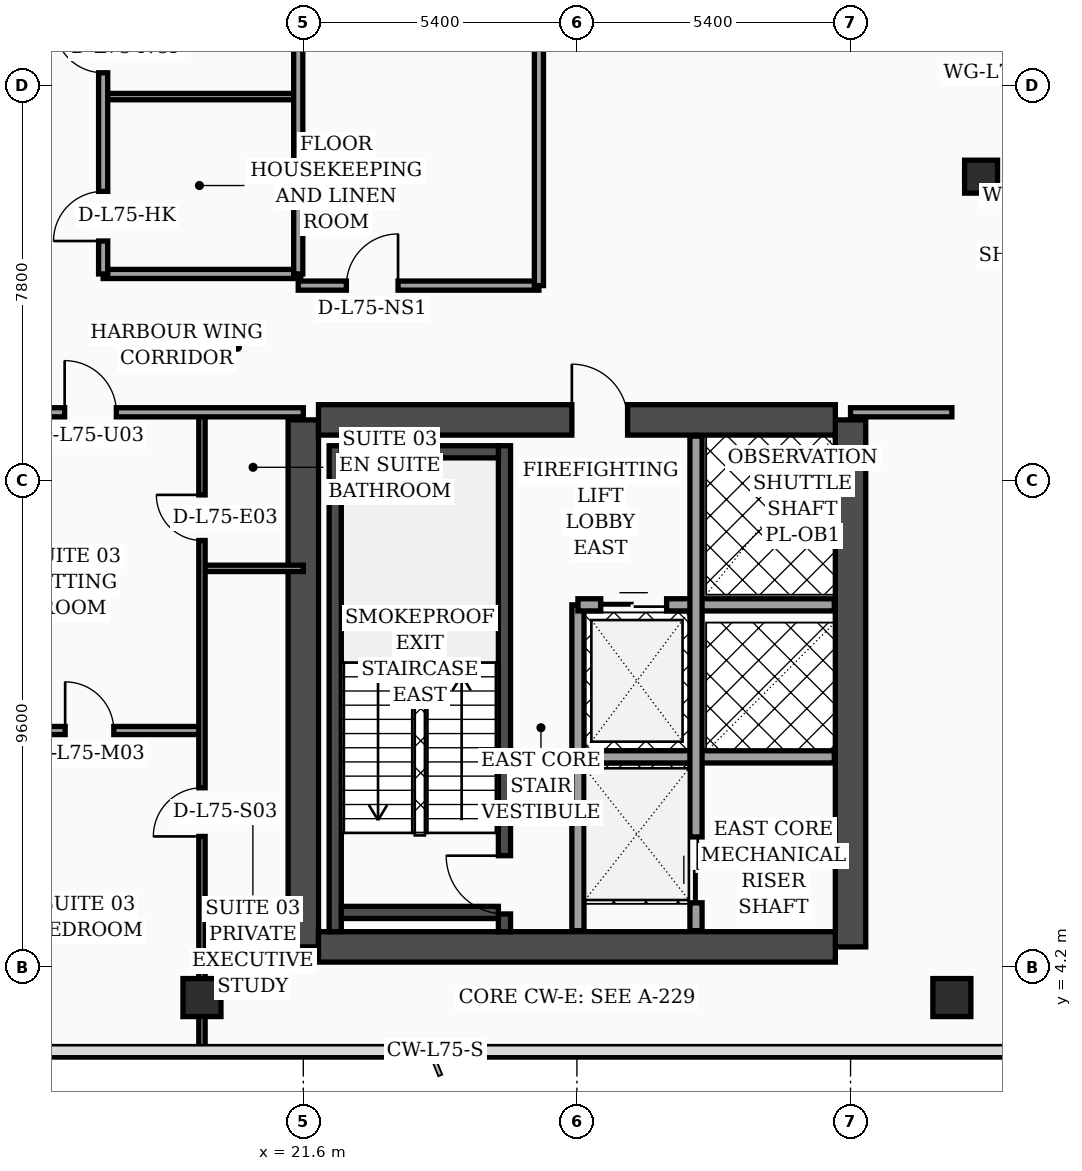
"""IFC4 building model, lengths in metres.
Left out: names, types, materials, properties, quantities, classifications, styles, units other than length and angle.
Written with IfcOpenShell. Run it as: python <this file> out.ifc"""

import sys

from ifc_helpers import new_model, si_unit, direction, frame, frame_2d, origin, origin_2d, place, context, subcontext, project, spatial, rectangle, hollow_rectangle, extrude, element, fill, save


model = new_model("IFC4")
c1 = context("Model", 3, precision=1e-05, world=origin(), true_north=direction((0.0, 1.0)))
c2 = subcontext(c1, "Body", "Model", "MODEL_VIEW")
j1 = project(units=[si_unit("LENGTHUNIT", "METRE"), si_unit("PLANEANGLEUNIT", "RADIAN")], contexts=[c1])
p1 = place(None, origin())
s1 = spatial("IfcSite", under=j1, at=p1, CompositionType="ELEMENT")
p2 = place(p1, origin())
s2 = spatial("IfcBuilding", under=s1, at=p2, CompositionType="ELEMENT")
p3 = place(p2, frame((0.0, 0.0, 302.5)))
s3 = spatial("IfcBuildingStorey", under=s2, at=p3, CompositionType="ELEMENT", Elevation=302.5)
for number, where, z_axis, x_axis in (
    (1, (21.6, 4.6, 0.0), (0.0, 0.0, 1.0), (0.0, 1.0, 0.0)),
    (2, (32.4, 4.6, 0.0), (0.0, 0.0, 1.0), (0.0, 1.0, 0.0)),
):
    element("IfcWall", number, at=place(p3, frame(where, z_axis=z_axis, x_axis=x_axis)), inside=s3, PredefinedType="SHEAR", context=c2, shape_type="SweptSolid", body=[
        extrude(rectangle(XDim=10.4, YDim=0.6, at=frame_2d((5.2, 0.0))), origin(), (0.0, 0.0, 1.0), 4.05),
    ])
p4 = place(p3, frame((21.9, 15.0, 0.0), z_axis=(0.0, 0.0, 1.0), x_axis=(1.0, 0.0, 0.0)))
e3 = element("IfcWall", 3, at=p4, inside=s3, PredefinedType="SHEAR", context=c2, shape_type="SweptSolid", body=[
    extrude(rectangle(XDim=10.2, YDim=0.6, at=frame_2d((5.1, 0.0))), origin(), (0.0, 0.0, 1.0), 4.05),
])
p5 = place(p4, frame((5.0, 0.0, 0.0)))
e4 = element("IfcOpeningElement", 4, at=p5, cuts=e3, PredefinedType="OPENING", context=c2, shape_type="SweptSolid", body=[
    extrude(rectangle(XDim=1.1, YDim=2.2, at=frame_2d((0.55, 1.1))), frame((0.0, 0.31, 0.0), z_axis=(0.0, -1.0, 0.0), x_axis=(1.0, 0.0, 0.0)), (0.0, 0.0, 1.0), 0.62),
])
p6 = place(p3, frame((21.9, 4.6, 0.0), z_axis=(0.0, 0.0, 1.0), x_axis=(1.0, 0.0, 0.0)))
e5 = element("IfcWall", 5, at=p6, inside=s3, PredefinedType="SHEAR", context=c2, shape_type="SweptSolid", body=[
    extrude(rectangle(XDim=10.2, YDim=0.6, at=frame_2d((5.1, 0.0))), origin(), (0.0, 0.0, 1.0), 4.05),
])
p7 = place(p3, frame((22.23, 4.9, 0.0), z_axis=(0.0, 0.0, 1.0), x_axis=(0.0, 1.0, 0.0)))
e6 = element("IfcWall", 6, at=p7, inside=s3, PredefinedType="SOLIDWALL", context=c2, shape_type="SweptSolid", body=[
    extrude(rectangle(XDim=9.59, YDim=0.24, at=frame_2d((4.795, 0.0))), origin(), (0.0, 0.0, 1.0), 4.05),
])
p8 = place(p3, frame((25.57, 4.9, 0.0), z_axis=(0.0, 0.0, 1.0), x_axis=(0.0, 1.0, 0.0)))
e7 = element("IfcWall", 7, at=p8, inside=s3, PredefinedType="SOLIDWALL", context=c2, shape_type="SweptSolid", body=[
    extrude(rectangle(XDim=9.59, YDim=0.24, at=frame_2d((4.795, 0.0))), origin(), (0.0, 0.0, 1.0), 4.05),
])
p9 = place(p8, frame((0.35, 0.0, 0.0)))
e8 = element("IfcOpeningElement", 8, at=p9, cuts=e7, PredefinedType="OPENING", context=c2, shape_type="SweptSolid", body=[
    extrude(rectangle(XDim=1.15, YDim=2.2, at=frame_2d((0.575, 1.1))), frame((0.0, 0.13, 0.0), z_axis=(0.0, -1.0, 0.0), x_axis=(1.0, 0.0, 0.0)), (0.0, 0.0, 1.0), 0.26),
])
for number, where, z_axis, x_axis in (
    (9, (22.35, 5.28, 0.0), (0.0, 0.0, 1.0), (1.0, 0.0, 0.0)),
    (10, (22.35, 14.37, 0.0), (0.0, 0.0, 1.0), (1.0, 0.0, 0.0)),
):
    element("IfcWall", number, at=place(p3, frame(where, z_axis=z_axis, x_axis=x_axis)), inside=s3, PredefinedType="SOLIDWALL", context=c2, shape_type="SweptSolid", body=[
        extrude(rectangle(XDim=3.1, YDim=0.24, at=frame_2d((1.55, 0.0))), origin(), (0.0, 0.0, 1.0), 4.05),
    ])
for number, where, z_axis, x_axis in (
    (11, (19.6, 3.6, 0.0), (0.0, 0.0, 1.0), (1.0, 0.0, 0.0)),
    (12, (34.4, 3.6, 0.0), (0.0, 0.0, 1.0), (1.0, 0.0, 0.0)),
):
    element("IfcColumn", number, at=place(p3, frame(where, z_axis=z_axis, x_axis=x_axis)), inside=s3, PredefinedType="COLUMN", context=c2, shape_type="SweptSolid", body=[
        extrude(hollow_rectangle(XDim=0.75, YDim=0.75, WallThickness=0.032, at=origin_2d()), origin(), (0.0, 0.0, 1.0), 4.05),
    ])
p10 = place(p3, frame((34.976, 19.8, 0.0), z_axis=(0.0, 0.0, 1.0), x_axis=(1.0, 0.0, 0.0)))
e13 = element("IfcColumn", 13, at=p10, inside=s3, PredefinedType="COLUMN", context=c2, shape_type="SweptSolid", body=[
    extrude(hollow_rectangle(XDim=0.65, YDim=0.65, WallThickness=0.028, at=origin_2d()), origin(), (0.0, 0.0, 1.0), 4.05),
])
p11 = place(p3, frame((41.03, 5.505, 0.0), z_axis=(0.0, 0.0, 1.0), x_axis=(-0.300509063924, 0.953778958931, 0.0)))
e14 = element("IfcWall", 14, at=p11, inside=s3, PredefinedType="SOLIDWALL", context=c2, shape_type="SweptSolid", body=[
    extrude(rectangle(XDim=30.814, YDim=0.32, at=frame_2d((15.407, 0.0))), origin(), (0.0, 0.0, 1.0), 4.05),
])
p12 = place(p11, frame((18.796, 0.0, 0.0)))
e15 = element("IfcOpeningElement", 15, at=p12, cuts=e14, PredefinedType="OPENING", context=c2, shape_type="SweptSolid", body=[
    extrude(rectangle(XDim=1.4, YDim=2.25, at=frame_2d((0.7, 1.125))), frame((0.0, 0.17, 0.0), z_axis=(0.0, -1.0, 0.0), x_axis=(1.0, 0.0, 0.0)), (0.0, 0.0, 1.0), 0.34),
])
p13 = place(p11, frame((4.437, 0.0, 0.7)))
e16 = element("IfcOpeningElement", 16, at=p13, cuts=e14, PredefinedType="OPENING", context=c2, shape_type="SweptSolid", body=[
    extrude(rectangle(XDim=1.6, YDim=1.65, at=frame_2d((0.8, 0.825))), frame((0.0, 0.17, 0.0), z_axis=(0.0, -1.0, 0.0), x_axis=(1.0, 0.0, 0.0)), (0.0, 0.0, 1.0), 0.34),
])
p14 = place(p11, frame((9.889, 0.0, 0.7)))
e17 = element("IfcOpeningElement", 17, at=p14, cuts=e14, PredefinedType="OPENING", context=c2, shape_type="SweptSolid", body=[
    extrude(rectangle(XDim=1.6, YDim=1.65, at=frame_2d((0.8, 0.825))), frame((0.0, 0.17, 0.0), z_axis=(0.0, -1.0, 0.0), x_axis=(1.0, 0.0, 0.0)), (0.0, 0.0, 1.0), 0.34),
])
p15 = place(p11, frame((1.6, 0.0, 0.75)))
e18 = element("IfcOpeningElement", 18, at=p15, cuts=e14, PredefinedType="OPENING", context=c2, shape_type="SweptSolid", body=[
    extrude(rectangle(XDim=1.5, YDim=1.6, at=frame_2d((0.75, 0.8))), frame((0.0, 0.17, 0.0), z_axis=(0.0, -1.0, 0.0), x_axis=(1.0, 0.0, 0.0)), (0.0, 0.0, 1.0), 0.34),
])
p16 = place(p11, frame((7.8, 0.0, 0.75)))
e19 = element("IfcOpeningElement", 19, at=p16, cuts=e14, PredefinedType="OPENING", context=c2, shape_type="SweptSolid", body=[
    extrude(rectangle(XDim=1.5, YDim=1.6, at=frame_2d((0.75, 0.8))), frame((0.0, 0.17, 0.0), z_axis=(0.0, -1.0, 0.0), x_axis=(1.0, 0.0, 0.0)), (0.0, 0.0, 1.0), 0.34),
])
p17 = place(p11, frame((11.95, 0.0, 0.75)))
e20 = element("IfcOpeningElement", 20, at=p17, cuts=e14, PredefinedType="OPENING", context=c2, shape_type="SweptSolid", body=[
    extrude(rectangle(XDim=1.5, YDim=1.6, at=frame_2d((0.75, 0.8))), frame((0.0, 0.17, 0.0), z_axis=(0.0, -1.0, 0.0), x_axis=(1.0, 0.0, 0.0)), (0.0, 0.0, 1.0), 0.34),
])
p18 = place(p11, frame((14.0, 0.0, 0.75)))
e21 = element("IfcOpeningElement", 21, at=p18, cuts=e14, PredefinedType="OPENING", context=c2, shape_type="SweptSolid", body=[
    extrude(rectangle(XDim=1.5, YDim=1.6, at=frame_2d((0.75, 0.8))), frame((0.0, 0.17, 0.0), z_axis=(0.0, -1.0, 0.0), x_axis=(1.0, 0.0, 0.0)), (0.0, 0.0, 1.0), 0.34),
])
p19 = place(p11, frame((16.55, 0.0, 0.75)))
e22 = element("IfcOpeningElement", 22, at=p19, cuts=e14, PredefinedType="OPENING", context=c2, shape_type="SweptSolid", body=[
    extrude(rectangle(XDim=1.5, YDim=1.6, at=frame_2d((0.75, 0.8))), frame((0.0, 0.17, 0.0), z_axis=(0.0, -1.0, 0.0), x_axis=(1.0, 0.0, 0.0)), (0.0, 0.0, 1.0), 0.34),
])
p20 = place(p11, frame((20.75, 0.0, 0.75)))
e23 = element("IfcOpeningElement", 23, at=p20, cuts=e14, PredefinedType="OPENING", context=c2, shape_type="SweptSolid", body=[
    extrude(rectangle(XDim=1.5, YDim=1.6, at=frame_2d((0.75, 0.8))), frame((0.0, 0.17, 0.0), z_axis=(0.0, -1.0, 0.0), x_axis=(1.0, 0.0, 0.0)), (0.0, 0.0, 1.0), 0.34),
])
p21 = place(p11, frame((23.3, 0.0, 0.75)))
e24 = element("IfcOpeningElement", 24, at=p21, cuts=e14, PredefinedType="OPENING", context=c2, shape_type="SweptSolid", body=[
    extrude(rectangle(XDim=1.5, YDim=1.6, at=frame_2d((0.75, 0.8))), frame((0.0, 0.17, 0.0), z_axis=(0.0, -1.0, 0.0), x_axis=(1.0, 0.0, 0.0)), (0.0, 0.0, 1.0), 0.34),
])
p22 = place(p11, frame((26.4, 0.0, 0.75)))
e25 = element("IfcOpeningElement", 25, at=p22, cuts=e14, PredefinedType="OPENING", context=c2, shape_type="SweptSolid", body=[
    extrude(rectangle(XDim=1.5, YDim=1.6, at=frame_2d((0.75, 0.8))), frame((0.0, 0.17, 0.0), z_axis=(0.0, -1.0, 0.0), x_axis=(1.0, 0.0, 0.0)), (0.0, 0.0, 1.0), 0.34),
])
p23 = place(p3, frame((27.02, 4.92, 0.0), z_axis=(0.0, 0.0, 1.0), x_axis=(0.0, 1.0, 0.0)))
e26 = element("IfcWall", 26, at=p23, inside=s3, PredefinedType="SOLIDWALL", context=c2, shape_type="SweptSolid", body=[
    extrude(rectangle(XDim=6.43, YDim=0.24, at=frame_2d((3.215, 0.0))), origin(), (0.0, 0.0, 1.0), 4.05),
])
p24 = place(p3, frame((27.02, 11.35, 0.0), z_axis=(0.0, 0.0, 1.0), x_axis=(1.0, 0.0, 0.0)))
e27 = element("IfcWall", 27, at=p24, inside=s3, PredefinedType="SOLIDWALL", context=c2, shape_type="SweptSolid", body=[
    extrude(rectangle(XDim=5.06, YDim=0.24, at=frame_2d((2.53, 0.0))), origin(), (0.0, 0.0, 1.0), 4.05),
])
p25 = place(p24, frame((0.45, 0.0, 0.0)))
e28 = element("IfcOpeningElement", 28, at=p25, cuts=e27, PredefinedType="OPENING", context=c2, shape_type="SweptSolid", body=[
    extrude(rectangle(XDim=1.3, YDim=2.35, at=frame_2d((0.65, 1.175))), frame((0.0, 0.13, 0.0), z_axis=(0.0, -1.0, 0.0), x_axis=(1.0, 0.0, 0.0)), (0.0, 0.0, 1.0), 0.26),
])
p26 = place(p3, frame((27.02, 8.35, 0.0), z_axis=(0.0, 0.0, 1.0), x_axis=(1.0, 0.0, 0.0)))
e29 = element("IfcWall", 29, at=p26, inside=s3, PredefinedType="SOLIDWALL", context=c2, shape_type="SweptSolid", body=[
    extrude(rectangle(XDim=5.06, YDim=0.24, at=frame_2d((2.53, 0.0))), origin(), (0.0, 0.0, 1.0), 4.05),
])
p27 = place(p3, frame((29.35, 4.92, 0.0), z_axis=(0.0, 0.0, 1.0), x_axis=(0.0, 1.0, 0.0)))
e30 = element("IfcWall", 30, at=p27, inside=s3, PredefinedType="SOLIDWALL", context=c2, shape_type="SweptSolid", body=[
    extrude(rectangle(XDim=9.76, YDim=0.24, at=frame_2d((4.88, 0.0))), origin(), (0.0, 0.0, 1.0), 4.05),
])
p28 = place(p27, frame((0.55, 0.0, 0.0)))
e31 = element("IfcOpeningElement", 31, at=p28, cuts=e30, PredefinedType="OPENING", context=c2, shape_type="SweptSolid", body=[
    extrude(rectangle(XDim=1.3, YDim=2.35, at=frame_2d((0.65, 1.175))), frame((0.0, 0.13, 0.0), z_axis=(0.0, -1.0, 0.0), x_axis=(1.0, 0.0, 0.0)), (0.0, 0.0, 1.0), 0.26),
])
p29 = place(p3, frame((19.6, 12.07, 0.0), z_axis=(0.0, 0.0, 1.0), x_axis=(1.0, 0.0, 0.0)))
e32 = element("IfcWall", 32, at=p29, inside=s3, PredefinedType="PARTITIONING", context=c2, shape_type="SweptSolid", body=[
    extrude(rectangle(XDim=2.0, YDim=0.125, at=frame_2d((1.0, 0.0))), origin(), (0.0, 0.0, 1.0), 4.05),
])
p30 = place(p3, frame((15.15, 8.87, 0.0), z_axis=(0.0, 0.0, 1.0), x_axis=(1.0, 0.0, 0.0)))
e33 = element("IfcWall", 33, at=p30, inside=s3, PredefinedType="PARTITIONING", context=c2, shape_type="SweptSolid", body=[
    extrude(rectangle(XDim=4.45, YDim=0.16, at=frame_2d((2.225, 0.0))), origin(), (0.0, 0.0, 1.0), 4.05),
])
p31 = place(p30, frame((1.75, 0.0, 0.0)))
e34 = element("IfcOpeningElement", 34, at=p31, cuts=e33, PredefinedType="OPENING", context=c2, shape_type="SweptSolid", body=[
    extrude(rectangle(XDim=0.96, YDim=2.2, at=frame_2d((0.48, 1.1))), frame((0.0, 0.09, 0.0), z_axis=(0.0, -1.0, 0.0), x_axis=(1.0, 0.0, 0.0)), (0.0, 0.0, 1.0), 0.18),
])
p32 = place(p3, frame((19.6, 2.44, 0.0), z_axis=(0.0, 0.0, 1.0), x_axis=(0.0, 1.0, 0.0)))
e35 = element("IfcWall", 35, at=p32, inside=s3, PredefinedType="PARTITIONING", context=c2, shape_type="SweptSolid", body=[
    extrude(rectangle(XDim=12.71, YDim=0.125, at=frame_2d((6.355, 0.0))), origin(), (0.0, 0.0, 1.0), 2.35),
])
p33 = place(p32, frame((4.34, 0.0, 0.0)))
e36 = element("IfcOpeningElement", 36, at=p33, cuts=e35, PredefinedType="OPENING", context=c2, shape_type="SweptSolid", body=[
    extrude(rectangle(XDim=0.96, YDim=2.2, at=frame_2d((0.48, 1.1))), frame((0.0, 0.073, 0.0), z_axis=(0.0, -1.0, 0.0), x_axis=(1.0, 0.0, 0.0)), (0.0, 0.0, 1.0), 0.145),
])
p34 = place(p32, frame((10.18, 0.0, 0.0)))
e37 = element("IfcOpeningElement", 37, at=p34, cuts=e35, PredefinedType="OPENING", context=c2, shape_type="SweptSolid", body=[
    extrude(rectangle(XDim=0.9, YDim=2.15, at=frame_2d((0.45, 1.075))), frame((0.0, 0.073, 0.0), z_axis=(0.0, -1.0, 0.0), x_axis=(1.0, 0.0, 0.0)), (0.0, 0.0, 1.0), 0.145),
])
p35 = place(p3, frame((15.15, 15.15, 0.0), z_axis=(0.0, 0.0, 1.0), x_axis=(1.0, 0.0, 0.0)))
e38 = element("IfcWall", 38, at=p35, inside=s3, PredefinedType="PARTITIONING", context=c2, shape_type="SweptSolid", body=[
    extrude(rectangle(XDim=6.45, YDim=0.18, at=frame_2d((3.225, 0.0))), origin(), (0.0, 0.0, 1.0), 3.1),
])
p36 = place(p35, frame((1.74, 0.0, 0.0)))
e39 = element("IfcOpeningElement", 39, at=p36, cuts=e38, PredefinedType="OPENING", context=c2, shape_type="SweptSolid", body=[
    extrude(rectangle(XDim=1.02, YDim=2.2, at=frame_2d((0.51, 1.1))), frame((0.0, 0.1, 0.0), z_axis=(0.0, -1.0, 0.0), x_axis=(1.0, 0.0, 0.0)), (0.0, 0.0, 1.0), 0.2),
])
p37 = place(p3, frame((17.65, 17.88, 0.0), z_axis=(0.0, 0.0, 1.0), x_axis=(1.0, 0.0, 0.0)))
e40 = element("IfcWall", 40, at=p37, inside=s3, PredefinedType="PARTITIONING", context=c2, shape_type="SweptSolid", body=[
    extrude(rectangle(XDim=3.9, YDim=0.18, at=frame_2d((1.95, 0.0))), origin(), (0.0, 0.0, 1.0), 4.05),
])
p38 = place(p3, frame((17.65, 21.38, 0.0), z_axis=(0.0, 0.0, 1.0), x_axis=(1.0, 0.0, 0.0)))
e41 = element("IfcWall", 41, at=p38, inside=s3, PredefinedType="PARTITIONING", context=c2, shape_type="SweptSolid", body=[
    extrude(rectangle(XDim=3.9, YDim=0.125, at=frame_2d((1.95, 0.0))), origin(), (0.0, 0.0, 1.0), 4.05),
])
p39 = place(p3, frame((21.5, 17.88, 0.0), z_axis=(0.0, 0.0, 1.0), x_axis=(0.0, 1.0, 0.0)))
e42 = element("IfcWall", 42, at=p39, inside=s3, PredefinedType="PARTITIONING", context=c2, shape_type="SweptSolid", body=[
    extrude(rectangle(XDim=6.44, YDim=0.18, at=frame_2d((3.22, 0.0))), origin(), (0.0, 0.0, 1.0), 4.05),
])
p40 = place(p3, frame((17.65, 17.88, 0.0), z_axis=(0.0, 0.0, 1.0), x_axis=(0.0, 1.0, 0.0)))
e43 = element("IfcWall", 43, at=p40, inside=s3, PredefinedType="PARTITIONING", context=c2, shape_type="SweptSolid", body=[
    extrude(rectangle(XDim=6.44, YDim=0.18, at=frame_2d((3.22, 0.0))), origin(), (0.0, 0.0, 1.0), 4.05),
])
p41 = place(p40, frame((0.65, 0.0, 0.0)))
e44 = element("IfcOpeningElement", 44, at=p41, cuts=e43, PredefinedType="OPENING", context=c2, shape_type="SweptSolid", body=[
    extrude(rectangle(XDim=0.98, YDim=2.15, at=frame_2d((0.49, 1.075))), frame((0.0, 0.1, 0.0), z_axis=(0.0, -1.0, 0.0), x_axis=(1.0, 0.0, 0.0)), (0.0, 0.0, 1.0), 0.2),
])
p42 = place(p40, frame((3.97, 0.0, 0.0)))
e45 = element("IfcOpeningElement", 45, at=p42, cuts=e43, PredefinedType="OPENING", context=c2, shape_type="SweptSolid", body=[
    extrude(rectangle(XDim=0.96, YDim=2.2, at=frame_2d((0.48, 1.1))), frame((0.0, 0.1, 0.0), z_axis=(0.0, -1.0, 0.0), x_axis=(1.0, 0.0, 0.0)), (0.0, 0.0, 1.0), 0.2),
])
p43 = place(p3, frame((32.4, 15.15, 0.0), z_axis=(0.0, 0.0, 1.0), x_axis=(1.0, 0.0, 0.0)))
e46 = element("IfcWall", 46, at=p43, inside=s3, PredefinedType="PARTITIONING", context=c2, shape_type="SweptSolid", body=[
    extrude(rectangle(XDim=2.0, YDim=0.18, at=frame_2d((1.0, 0.0))), origin(), (0.0, 0.0, 1.0), 2.35),
])
p44 = place(p3, frame((21.5, 17.65, 0.0), z_axis=(0.0, 0.0, 1.0), x_axis=(1.0, 0.0, 0.0)))
e47 = element("IfcWall", 47, at=p44, inside=s3, PredefinedType="PARTITIONING", context=c2, shape_type="SweptSolid", body=[
    extrude(rectangle(XDim=4.75, YDim=0.18, at=frame_2d((2.375, 0.0))), origin(), (0.0, 0.0, 1.0), 4.05),
])
p45 = place(p44, frame((0.95, 0.0, 0.0)))
e48 = element("IfcOpeningElement", 48, at=p45, cuts=e47, PredefinedType="OPENING", context=c2, shape_type="SweptSolid", body=[
    extrude(rectangle(XDim=1.02, YDim=2.2, at=frame_2d((0.51, 1.1))), frame((0.0, 0.1, 0.0), z_axis=(0.0, -1.0, 0.0), x_axis=(1.0, 0.0, 0.0)), (0.0, 0.0, 1.0), 0.2),
])
p46 = place(p3, frame((26.25, 17.65, 0.0), z_axis=(0.0, 0.0, 1.0), x_axis=(0.0, 1.0, 0.0)))
e49 = element("IfcWall", 49, at=p46, inside=s3, PredefinedType="PARTITIONING", context=c2, shape_type="SweptSolid", body=[
    extrude(rectangle(XDim=17.03, YDim=0.18, at=frame_2d((8.515, 0.0))), origin(), (0.0, 0.0, 1.0), 2.35),
])
p47 = place(p25, origin())
e50 = element("IfcDoor", 50, at=p47, inside=s3, OperationType="DOUBLE_DOOR_SLIDING", PredefinedType="DOOR", context=c2, shape_type="SweptSolid", body=[
    extrude(rectangle(XDim=1.3, YDim=2.35, at=frame_2d((0.65, 1.175))), frame((0.0, 0.025, 0.0), z_axis=(0.0, -1.0, 0.0), x_axis=(1.0, 0.0, 0.0)), (0.0, 0.0, 1.0), 0.05),
])
fill(e28, e50)
p48 = place(p28, origin())
e51 = element("IfcDoor", 51, at=p48, inside=s3, OperationType="DOUBLE_DOOR_SLIDING", PredefinedType="DOOR", context=c2, shape_type="SweptSolid", body=[
    extrude(rectangle(XDim=1.3, YDim=2.35, at=frame_2d((0.65, 1.175))), frame((0.0, 0.025, 0.0), z_axis=(0.0, -1.0, 0.0), x_axis=(1.0, 0.0, 0.0)), (0.0, 0.0, 1.0), 0.05),
])
fill(e31, e51)
p49 = place(p31, origin())
e52 = element("IfcDoor", 52, at=p49, inside=s3, OperationType="SINGLE_SWING_LEFT", PredefinedType="DOOR", context=c2, shape_type="SweptSolid", body=[
    extrude(rectangle(XDim=0.96, YDim=2.2, at=frame_2d((0.48, 1.1))), frame((0.0, 0.025, 0.0), z_axis=(0.0, -1.0, 0.0), x_axis=(1.0, 0.0, 0.0)), (0.0, 0.0, 1.0), 0.05),
])
fill(e34, e52)
p50 = place(p33, origin())
e53 = element("IfcDoor", 53, at=p50, inside=s3, OperationType="SINGLE_SWING_LEFT", PredefinedType="DOOR", context=c2, shape_type="SweptSolid", body=[
    extrude(rectangle(XDim=0.96, YDim=2.2, at=frame_2d((0.48, 1.1))), frame((0.0, 0.025, 0.0), z_axis=(0.0, -1.0, 0.0), x_axis=(1.0, 0.0, 0.0)), (0.0, 0.0, 1.0), 0.05),
])
fill(e36, e53)
p51 = place(p34, origin())
e54 = element("IfcDoor", 54, at=p51, inside=s3, OperationType="SINGLE_SWING_RIGHT", PredefinedType="DOOR", context=c2, shape_type="SweptSolid", body=[
    extrude(rectangle(XDim=0.9, YDim=2.15, at=frame_2d((0.45, 1.075))), frame((0.0, 0.025, 0.0), z_axis=(0.0, -1.0, 0.0), x_axis=(1.0, 0.0, 0.0)), (0.0, 0.0, 1.0), 0.05),
])
fill(e37, e54)
p52 = place(p36, origin())
e55 = element("IfcDoor", 55, at=p52, inside=s3, OperationType="SINGLE_SWING_LEFT", PredefinedType="DOOR", context=c2, shape_type="SweptSolid", body=[
    extrude(rectangle(XDim=1.02, YDim=2.2, at=frame_2d((0.51, 1.1))), frame((0.0, 0.025, 0.0), z_axis=(0.0, -1.0, 0.0), x_axis=(1.0, 0.0, 0.0)), (0.0, 0.0, 1.0), 0.05),
])
fill(e39, e55)
p53 = place(p41, origin())
e56 = element("IfcDoor", 56, at=p53, inside=s3, OperationType="SINGLE_SWING_LEFT", PredefinedType="DOOR", context=c2, shape_type="SweptSolid", body=[
    extrude(rectangle(XDim=0.98, YDim=2.15, at=frame_2d((0.49, 1.075))), frame((0.0, 0.025, 0.0), z_axis=(0.0, -1.0, 0.0), x_axis=(1.0, 0.0, 0.0)), (0.0, 0.0, 1.0), 0.05),
])
fill(e44, e56)
p54 = place(p42, origin())
e57 = element("IfcDoor", 57, at=p54, inside=s3, OperationType="SINGLE_SWING_RIGHT", PredefinedType="DOOR", context=c2, shape_type="SweptSolid", body=[
    extrude(rectangle(XDim=0.96, YDim=2.2, at=frame_2d((0.48, 1.1))), frame((0.0, 0.025, 0.0), z_axis=(0.0, -1.0, 0.0), x_axis=(1.0, 0.0, 0.0)), (0.0, 0.0, 1.0), 0.05),
])
fill(e45, e57)
p55 = place(p45, origin())
e58 = element("IfcDoor", 58, at=p55, inside=s3, OperationType="SINGLE_SWING_RIGHT", PredefinedType="DOOR", context=c2, shape_type="SweptSolid", body=[
    extrude(rectangle(XDim=1.02, YDim=2.2, at=frame_2d((0.51, 1.1))), frame((0.0, 0.025, 0.0), z_axis=(0.0, -1.0, 0.0), x_axis=(1.0, 0.0, 0.0)), (0.0, 0.0, 1.0), 0.05),
])
fill(e48, e58)
p56 = place(p9, origin())
e59 = element("IfcDoor", 59, at=p56, inside=s3, OperationType="SINGLE_SWING_RIGHT", PredefinedType="DOOR", context=c2, shape_type="SweptSolid", body=[
    extrude(rectangle(XDim=1.15, YDim=2.2, at=frame_2d((0.575, 1.1))), frame((0.0, 0.025, 0.0), z_axis=(0.0, -1.0, 0.0), x_axis=(1.0, 0.0, 0.0)), (0.0, 0.0, 1.0), 0.05),
])
fill(e8, e59)
p57 = place(p5, origin())
e60 = element("IfcDoor", 60, at=p57, inside=s3, OperationType="SINGLE_SWING_LEFT", PredefinedType="DOOR", context=c2, shape_type="SweptSolid", body=[
    extrude(rectangle(XDim=1.1, YDim=2.2, at=frame_2d((0.55, 1.1))), frame((0.0, 0.025, 0.0), z_axis=(0.0, -1.0, 0.0), x_axis=(1.0, 0.0, 0.0)), (0.0, 0.0, 1.0), 0.05),
])
fill(e4, e60)
save(model, sys.argv[1])
